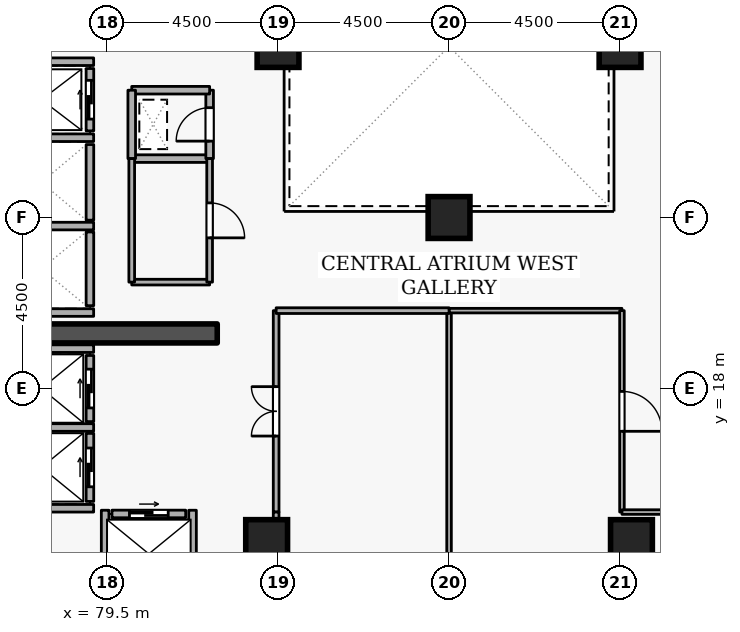
"""IFC4 building model, lengths in metres.
Left out: names, types, materials, properties, quantities, classifications, styles, units other than length and angle.
Written with IfcOpenShell. Run it as: python <this file> out.ifc"""

import sys

from ifc_helpers import new_model, si_unit, direction, frame, frame_2d, origin, origin_2d, place, context, subcontext, project, spatial, rectangle, extrude, element, fill, save


model = new_model("IFC4")
c1 = context("Model", 3, precision=1e-05, world=origin(), true_north=direction((0.0, 1.0)))
c2 = subcontext(c1, "Body", "Model", "MODEL_VIEW")
j1 = project(units=[si_unit("LENGTHUNIT", "METRE"), si_unit("PLANEANGLEUNIT", "RADIAN")], contexts=[c1])
p1 = place(None, origin())
s1 = spatial("IfcSite", under=j1, at=p1, CompositionType="ELEMENT")
p2 = place(p1, origin())
s2 = spatial("IfcBuilding", under=s1, at=p2, CompositionType="ELEMENT")
p3 = place(p2, frame((0.0, 0.0, 152.7)))
s3 = spatial("IfcBuildingStorey", under=s2, at=p3, CompositionType="ELEMENT", Elevation=152.7)
p4 = place(p3, frame((76.6, 19.45, 0.0), z_axis=(0.0, 0.0, 1.0), x_axis=(1.0, 0.0, 0.0)))
e1 = element("IfcWall", 1, at=p4, inside=s3, PredefinedType="SHEAR", context=c2, shape_type="SweptSolid", body=[
    extrude(rectangle(XDim=5.8, YDim=0.5, at=frame_2d((2.9, 0.0))), origin(), (0.0, 0.0, 1.0), 3.6),
])
for number, where, z_axis, x_axis in (
    (2, (93.3, 14.0, 0.0), (0.0, 0.0, 1.0), (1.0, 0.0, 0.0)),
    (3, (83.7, 14.0, 0.0), (0.0, 0.0, 1.0), (1.0, 0.0, 0.0)),
    (4, (93.0, 27.0, 0.0), (0.0, 0.0, 1.0), (1.0, 0.0, 0.0)),
    (5, (84.0, 27.0, 0.0), (0.0, 0.0, 1.0), (1.0, 0.0, 0.0)),
    (6, (88.5, 22.5, 0.0), (0.0, 0.0, 1.0), (1.0, 0.0, 0.0)),
):
    element("IfcColumn", number, at=place(p3, frame(where, z_axis=z_axis, x_axis=x_axis)), inside=s3, PredefinedType="COLUMN", context=c2, shape_type="SweptSolid", body=[
        extrude(rectangle(XDim=1.1, YDim=1.1, at=origin_2d()), origin(), (0.0, 0.0, 1.0), 3.6),
    ])
p5 = place(p3, frame((79.05, 24.78, 0.0), z_axis=(0.0, 0.0, 1.0), x_axis=(0.0, 1.0, 0.0)))
e7 = element("IfcWall", 7, at=p5, inside=s3, PredefinedType="STANDARD", context=c2, shape_type="SweptSolid", body=[
    extrude(rectangle(XDim=1.64, YDim=0.2, at=frame_2d((0.82, 0.0))), origin(), (0.0, 0.0, 1.0), 3.34),
])
p6 = place(p5, frame((0.31, 0.0, 0.0)))
e8 = element("IfcOpeningElement", 8, at=p6, cuts=e7, PredefinedType="OPENING", context=c2, shape_type="SweptSolid", body=[
    extrude(rectangle(XDim=1.02, YDim=2.06, at=frame_2d((0.51, 1.03))), frame((0.0, 0.11, 0.0), z_axis=(0.0, -1.0, 0.0), x_axis=(1.0, 0.0, 0.0)), (0.0, 0.0, 1.0), 0.22),
])
p7 = place(p3, frame((79.05, 22.43, 0.0), z_axis=(0.0, 0.0, 1.0), x_axis=(0.0, 1.0, 0.0)))
e9 = element("IfcWall", 9, at=p7, inside=s3, PredefinedType="STANDARD", context=c2, shape_type="SweptSolid", body=[
    extrude(rectangle(XDim=1.99, YDim=0.2, at=frame_2d((0.995, 0.0))), origin(), (0.0, 0.0, 1.0), 3.34),
])
p8 = place(p3, frame((79.05, 20.18, 0.0), z_axis=(0.0, 0.0, 1.0), x_axis=(0.0, 1.0, 0.0)))
e10 = element("IfcWall", 10, at=p8, inside=s3, PredefinedType="STANDARD", context=c2, shape_type="SweptSolid", body=[
    extrude(rectangle(XDim=1.94, YDim=0.2, at=frame_2d((0.97, 0.0))), origin(), (0.0, 0.0, 1.0), 3.34),
])
p9 = place(p3, frame((79.05, 17.13, 0.0), z_axis=(0.0, 0.0, 1.0), x_axis=(0.0, 1.0, 0.0)))
e11 = element("IfcWall", 11, at=p9, inside=s3, PredefinedType="STANDARD", context=c2, shape_type="SweptSolid", body=[
    extrude(rectangle(XDim=1.74, YDim=0.2, at=frame_2d((0.87, 0.0))), origin(), (0.0, 0.0, 1.0), 3.34),
])
p10 = place(p9, frame((0.36, 0.0, 0.0)))
e12 = element("IfcOpeningElement", 12, at=p10, cuts=e11, PredefinedType="OPENING", context=c2, shape_type="SweptSolid", body=[
    extrude(rectangle(XDim=1.02, YDim=2.06, at=frame_2d((0.51, 1.03))), frame((0.0, 0.11, 0.0), z_axis=(0.0, -1.0, 0.0), x_axis=(1.0, 0.0, 0.0)), (0.0, 0.0, 1.0), 0.22),
])
p11 = place(p3, frame((79.05, 15.03, 0.0), z_axis=(0.0, 0.0, 1.0), x_axis=(0.0, 1.0, 0.0)))
e13 = element("IfcWall", 13, at=p11, inside=s3, PredefinedType="STANDARD", context=c2, shape_type="SweptSolid", body=[
    extrude(rectangle(XDim=1.79, YDim=0.2, at=frame_2d((0.895, 0.0))), origin(), (0.0, 0.0, 1.0), 3.34),
])
p12 = place(p11, frame((0.385, 0.0, 0.0)))
e14 = element("IfcOpeningElement", 14, at=p12, cuts=e13, PredefinedType="OPENING", context=c2, shape_type="SweptSolid", body=[
    extrude(rectangle(XDim=1.02, YDim=2.06, at=frame_2d((0.51, 1.03))), frame((0.0, 0.11, 0.0), z_axis=(0.0, -1.0, 0.0), x_axis=(1.0, 0.0, 0.0)), (0.0, 0.0, 1.0), 0.22),
])
p13 = place(p3, frame((79.63, 14.7, 0.0), z_axis=(0.0, 0.0, 1.0), x_axis=(1.0, 0.0, 0.0)))
e15 = element("IfcWall", 15, at=p13, inside=s3, PredefinedType="STANDARD", context=c2, shape_type="SweptSolid", body=[
    extrude(rectangle(XDim=1.94, YDim=0.2, at=frame_2d((0.97, 0.0))), origin(), (0.0, 0.0, 1.0), 3.34),
])
p14 = place(p13, frame((0.46, 0.0, 0.0)))
e16 = element("IfcOpeningElement", 16, at=p14, cuts=e15, PredefinedType="OPENING", context=c2, shape_type="SweptSolid", body=[
    extrude(rectangle(XDim=1.02, YDim=2.06, at=frame_2d((0.51, 1.03))), frame((0.0, 0.11, 0.0), z_axis=(0.0, -1.0, 0.0), x_axis=(1.0, 0.0, 0.0)), (0.0, 0.0, 1.0), 0.22),
])
for number, where, z_axis, x_axis in (
    (17, (76.612, 26.6, 0.0), (0.0, 0.0, 1.0), (1.0, 0.0, 0.0)),
    (18, (76.612, 24.6, 0.0), (0.0, 0.0, 1.0), (1.0, 0.0, 0.0)),
    (19, (76.612, 22.275, 0.0), (0.0, 0.0, 1.0), (1.0, 0.0, 0.0)),
    (20, (76.612, 20.0, 0.0), (0.0, 0.0, 1.0), (1.0, 0.0, 0.0)),
):
    element("IfcWall", number, at=place(p3, frame(where, z_axis=z_axis, x_axis=x_axis)), inside=s3, PredefinedType="STANDARD", context=c2, shape_type="SweptSolid", body=[
        extrude(rectangle(XDim=2.536, YDim=0.2, at=frame_2d((1.268, 0.0))), origin(), (0.0, 0.0, 1.0), 3.34),
    ])
p15 = place(p3, frame((76.402, 19.05, 0.0), z_axis=(0.0, 0.0, 1.0), x_axis=(1.0, 0.0, 0.0)))
e21 = element("IfcWall", 21, at=p15, inside=s3, PredefinedType="STANDARD", context=c2, shape_type="SweptSolid", body=[
    extrude(rectangle(XDim=2.746, YDim=0.2, at=frame_2d((1.373, 0.0))), origin(), (0.0, 0.0, 1.0), 2.545),
])
p16 = place(p3, frame((76.402, 16.975, 0.0), z_axis=(0.0, 0.0, 1.0), x_axis=(1.0, 0.0, 0.0)))
e22 = element("IfcWall", 22, at=p16, inside=s3, PredefinedType="STANDARD", context=c2, shape_type="SweptSolid", body=[
    extrude(rectangle(XDim=2.746, YDim=0.2, at=frame_2d((1.373, 0.0))), origin(), (0.0, 0.0, 1.0), 3.34),
])
p17 = place(p3, frame((76.512, 14.85, 0.0), z_axis=(0.0, 0.0, 1.0), x_axis=(1.0, 0.0, 0.0)))
e23 = element("IfcWall", 23, at=p17, inside=s3, PredefinedType="STANDARD", context=c2, shape_type="SweptSolid", body=[
    extrude(rectangle(XDim=2.636, YDim=0.2, at=frame_2d((1.318, 0.0))), origin(), (0.0, 0.0, 1.0), 3.34),
])
for number, where, z_axis, x_axis in (
    (24, (81.75, 12.612, 0.0), (0.0, 0.0, 1.0), (0.0, 1.0, 0.0)),
    (25, (79.45, 12.612, 0.0), (0.0, 0.0, 1.0), (0.0, 1.0, 0.0)),
):
    element("IfcWall", number, at=place(p3, frame(where, z_axis=z_axis, x_axis=x_axis)), inside=s3, PredefinedType="STANDARD", context=c2, shape_type="SweptSolid", body=[
        extrude(rectangle(XDim=2.186, YDim=0.2, at=frame_2d((1.093, 0.0))), origin(), (0.0, 0.0, 1.0), 3.34),
    ])
p18 = place(p3, frame((80.15, 24.05, 0.0), z_axis=(0.0, 0.0, 1.0), x_axis=(1.0, 0.0, 0.0)))
e26 = element("IfcWall", 26, at=p18, inside=s3, PredefinedType="STANDARD", context=c2, shape_type="SweptSolid", body=[
    extrude(rectangle(XDim=2.05, YDim=0.2, at=frame_2d((1.025, 0.0))), origin(), (0.0, 0.0, 1.0), 3.34),
])
p19 = place(p3, frame((82.2, 24.05, 0.0), z_axis=(0.0, 0.0, 1.0), x_axis=(0.0, 1.0, 0.0)))
e27 = element("IfcWall", 27, at=p19, inside=s3, PredefinedType="STANDARD", context=c2, shape_type="SweptSolid", body=[
    extrude(rectangle(XDim=1.8, YDim=0.2, at=frame_2d((0.9, 0.0))), origin(), (0.0, 0.0, 1.0), 3.34),
])
p20 = place(p19, frame((0.46, 0.0, 0.0)))
e28 = element("IfcOpeningElement", 28, at=p20, cuts=e27, PredefinedType="OPENING", context=c2, shape_type="SweptSolid", body=[
    extrude(rectangle(XDim=0.88, YDim=2.04, at=frame_2d((0.44, 1.02))), frame((0.0, 0.11, 0.0), z_axis=(0.0, -1.0, 0.0), x_axis=(1.0, 0.0, 0.0)), (0.0, 0.0, 1.0), 0.22),
])
p21 = place(p3, frame((82.2, 25.85, 0.0), z_axis=(0.0, 0.0, 1.0), x_axis=(-1.0, 0.0, 0.0)))
e29 = element("IfcWall", 29, at=p21, inside=s3, PredefinedType="STANDARD", context=c2, shape_type="SweptSolid", body=[
    extrude(rectangle(XDim=2.05, YDim=0.2, at=frame_2d((1.025, 0.0))), origin(), (0.0, 0.0, 1.0), 3.34),
])
p22 = place(p3, frame((80.15, 25.85, 0.0), z_axis=(0.0, 0.0, 1.0), x_axis=(0.0, -1.0, 0.0)))
e30 = element("IfcWall", 30, at=p22, inside=s3, PredefinedType="STANDARD", context=c2, shape_type="SweptSolid", body=[
    extrude(rectangle(XDim=1.8, YDim=0.2, at=frame_2d((0.9, 0.0))), origin(), (0.0, 0.0, 1.0), 3.34),
])
p23 = place(p3, frame((82.2, 20.8, 0.0), z_axis=(0.0, 0.0, 1.0), x_axis=(-1.0, 0.0, 0.0)))
e31 = element("IfcWall", 31, at=p23, inside=s3, PredefinedType="PARTITIONING", context=c2, shape_type="SweptSolid", body=[
    extrude(rectangle(XDim=2.05, YDim=0.15, at=frame_2d((1.025, 0.0))), origin(), (0.0, 0.0, 1.0), 3.34),
])
p24 = place(p3, frame((80.15, 20.8, 0.0), z_axis=(0.0, 0.0, 1.0), x_axis=(0.0, 1.0, 0.0)))
e32 = element("IfcWall", 32, at=p24, inside=s3, PredefinedType="PARTITIONING", context=c2, shape_type="SweptSolid", body=[
    extrude(rectangle(XDim=3.25, YDim=0.15, at=frame_2d((1.625, 0.0))), origin(), (0.0, 0.0, 1.0), 3.34),
])
p25 = place(p3, frame((82.2, 24.05, 0.0), z_axis=(0.0, 0.0, 1.0), x_axis=(0.0, -1.0, 0.0)))
e33 = element("IfcWall", 33, at=p25, inside=s3, PredefinedType="PARTITIONING", context=c2, shape_type="SweptSolid", body=[
    extrude(rectangle(XDim=3.25, YDim=0.15, at=frame_2d((1.625, 0.0))), origin(), (0.0, 0.0, 1.0), 3.34),
])
p26 = place(p25, frame((1.165, 0.0, 0.0)))
e34 = element("IfcOpeningElement", 34, at=p26, cuts=e33, PredefinedType="OPENING", context=c2, shape_type="SweptSolid", body=[
    extrude(rectangle(XDim=0.92, YDim=2.08, at=frame_2d((0.46, 1.04))), frame((0.0, 0.085, 0.0), z_axis=(0.0, -1.0, 0.0), x_axis=(1.0, 0.0, 0.0)), (0.0, 0.0, 1.0), 0.17),
])
p27 = place(p3, frame((88.5, 9.28, 0.0), z_axis=(0.0, 0.0, 1.0), x_axis=(0.0, 1.0, 0.0)))
e35 = element("IfcWall", 35, at=p27, inside=s3, PredefinedType="PARTITIONING", context=c2, shape_type="SweptSolid", body=[
    extrude(rectangle(XDim=10.77, YDim=0.12, at=frame_2d((5.385, 0.0))), origin(), (0.0, 0.0, 1.0), 2.932),
])
p28 = place(p3, frame((88.5, 20.05, 0.0), z_axis=(0.0, 0.0, 1.0), x_axis=(1.0, 0.0, 0.0)))
e36 = element("IfcWall", 36, at=p28, inside=s3, PredefinedType="PARTITIONING", context=c2, shape_type="SweptSolid", body=[
    extrude(rectangle(XDim=4.55, YDim=0.12, at=frame_2d((2.275, 0.0))), origin(), (0.0, 0.0, 1.0), 3.34),
])
p29 = place(p3, frame((93.05, 20.05, 0.0), z_axis=(0.0, 0.0, 1.0), x_axis=(0.0, -1.0, 0.0)))
e37 = element("IfcWall", 37, at=p29, inside=s3, PredefinedType="PARTITIONING", context=c2, shape_type="SweptSolid", body=[
    extrude(rectangle(XDim=5.3, YDim=0.12, at=frame_2d((2.65, 0.0))), origin(), (0.0, 0.0, 1.0), 3.34),
])
p30 = place(p29, frame((2.125, 0.0, 0.0)))
e38 = element("IfcOpeningElement", 38, at=p30, cuts=e37, PredefinedType="OPENING", context=c2, shape_type="SweptSolid", body=[
    extrude(rectangle(XDim=1.05, YDim=2.1, at=frame_2d((0.525, 1.05))), frame((0.0, 0.07, 0.0), z_axis=(0.0, -1.0, 0.0), x_axis=(1.0, 0.0, 0.0)), (0.0, 0.0, 1.0), 0.14),
])
p31 = place(p3, frame((93.05, 14.75, 0.0), z_axis=(0.0, 0.0, 1.0), x_axis=(1.0, 0.0, 0.0)))
e39 = element("IfcWall", 39, at=p31, inside=s3, PredefinedType="PARTITIONING", context=c2, shape_type="SweptSolid", body=[
    extrude(rectangle(XDim=1.75, YDim=0.12, at=frame_2d((0.875, 0.0))), origin(), (0.0, 0.0, 1.0), 3.34),
])
p32 = place(p3, frame((83.95, 14.75, 0.0), z_axis=(0.0, 0.0, 1.0), x_axis=(0.0, 1.0, 0.0)))
e40 = element("IfcWall", 40, at=p32, inside=s3, PredefinedType="PARTITIONING", context=c2, shape_type="SweptSolid", body=[
    extrude(rectangle(XDim=5.3, YDim=0.15, at=frame_2d((2.65, 0.0))), origin(), (0.0, 0.0, 1.0), 3.34),
])
p33 = place(p32, frame((2.0, 0.0, 0.0)))
e41 = element("IfcOpeningElement", 41, at=p33, cuts=e40, PredefinedType="OPENING", context=c2, shape_type="SweptSolid", body=[
    extrude(rectangle(XDim=1.3, YDim=2.12, at=frame_2d((0.65, 1.06))), frame((0.0, 0.085, 0.0), z_axis=(0.0, -1.0, 0.0), x_axis=(1.0, 0.0, 0.0)), (0.0, 0.0, 1.0), 0.17),
])
p34 = place(p3, frame((83.95, 20.05, 0.0), z_axis=(0.0, 0.0, 1.0), x_axis=(1.0, 0.0, 0.0)))
e42 = element("IfcWall", 42, at=p34, inside=s3, PredefinedType="PARTITIONING", context=c2, shape_type="SweptSolid", body=[
    extrude(rectangle(XDim=4.55, YDim=0.15, at=frame_2d((2.275, 0.0))), origin(), (0.0, 0.0, 1.0), 3.34),
])
p35 = place(p3, frame((83.95, 12.4, 0.0), z_axis=(0.0, 0.0, 1.0), x_axis=(0.0, 1.0, 0.0)))
e43 = element("IfcWall", 43, at=p35, inside=s3, PredefinedType="PARTITIONING", context=c2, shape_type="SweptSolid", body=[
    extrude(rectangle(XDim=2.35, YDim=0.15, at=frame_2d((1.175, 0.0))), origin(), (0.0, 0.0, 1.0), 3.34),
])
p36 = place(p6, origin())
e44 = element("IfcDoor", 44, at=p36, inside=s3, OperationType="SLIDING_TO_LEFT", PredefinedType="DOOR", context=c2, shape_type="SweptSolid", body=[
    extrude(rectangle(XDim=1.02, YDim=2.06, at=frame_2d((0.51, 1.03))), frame((0.0, 0.025, 0.0), z_axis=(0.0, -1.0, 0.0), x_axis=(1.0, 0.0, 0.0)), (0.0, 0.0, 1.0), 0.05),
])
fill(e8, e44)
p37 = place(p10, origin())
e45 = element("IfcDoor", 45, at=p37, inside=s3, OperationType="SLIDING_TO_LEFT", PredefinedType="DOOR", context=c2, shape_type="SweptSolid", body=[
    extrude(rectangle(XDim=1.02, YDim=2.06, at=frame_2d((0.51, 1.03))), frame((0.0, 0.025, 0.0), z_axis=(0.0, -1.0, 0.0), x_axis=(1.0, 0.0, 0.0)), (0.0, 0.0, 1.0), 0.05),
])
fill(e12, e45)
p38 = place(p12, origin())
e46 = element("IfcDoor", 46, at=p38, inside=s3, OperationType="SLIDING_TO_LEFT", PredefinedType="DOOR", context=c2, shape_type="SweptSolid", body=[
    extrude(rectangle(XDim=1.02, YDim=2.06, at=frame_2d((0.51, 1.03))), frame((0.0, 0.025, 0.0), z_axis=(0.0, -1.0, 0.0), x_axis=(1.0, 0.0, 0.0)), (0.0, 0.0, 1.0), 0.05),
])
fill(e14, e46)
p39 = place(p14, origin())
e47 = element("IfcDoor", 47, at=p39, inside=s3, OperationType="SLIDING_TO_LEFT", PredefinedType="DOOR", context=c2, shape_type="SweptSolid", body=[
    extrude(rectangle(XDim=1.02, YDim=2.06, at=frame_2d((0.51, 1.03))), frame((0.0, 0.025, 0.0), z_axis=(0.0, -1.0, 0.0), x_axis=(1.0, 0.0, 0.0)), (0.0, 0.0, 1.0), 0.05),
])
fill(e16, e47)
p40 = place(p20, origin())
e48 = element("IfcDoor", 48, at=p40, inside=s3, OperationType="SINGLE_SWING_LEFT", PredefinedType="DOOR", context=c2, shape_type="SweptSolid", body=[
    extrude(rectangle(XDim=0.88, YDim=2.04, at=frame_2d((0.44, 1.02))), frame((0.0, 0.025, 0.0), z_axis=(0.0, -1.0, 0.0), x_axis=(1.0, 0.0, 0.0)), (0.0, 0.0, 1.0), 0.05),
])
fill(e28, e48)
p41 = place(p26, origin())
e49 = element("IfcDoor", 49, at=p41, inside=s3, OperationType="SINGLE_SWING_RIGHT", PredefinedType="DOOR", context=c2, shape_type="SweptSolid", body=[
    extrude(rectangle(XDim=0.92, YDim=2.08, at=frame_2d((0.46, 1.04))), frame((0.0, 0.025, 0.0), z_axis=(0.0, -1.0, 0.0), x_axis=(1.0, 0.0, 0.0)), (0.0, 0.0, 1.0), 0.05),
])
fill(e34, e49)
p42 = place(p30, origin())
e50 = element("IfcDoor", 50, at=p42, inside=s3, OperationType="SINGLE_SWING_RIGHT", PredefinedType="DOOR", context=c2, shape_type="SweptSolid", body=[
    extrude(rectangle(XDim=1.05, YDim=2.1, at=frame_2d((0.525, 1.05))), frame((0.0, 0.025, 0.0), z_axis=(0.0, -1.0, 0.0), x_axis=(1.0, 0.0, 0.0)), (0.0, 0.0, 1.0), 0.05),
])
fill(e38, e50)
p43 = place(p33, origin())
e51 = element("IfcDoor", 51, at=p43, inside=s3, OperationType="DOUBLE_DOOR_SINGLE_SWING", PredefinedType="DOOR", context=c2, shape_type="SweptSolid", body=[
    extrude(rectangle(XDim=1.3, YDim=2.12, at=frame_2d((0.65, 1.06))), frame((0.0, 0.025, 0.0), z_axis=(0.0, -1.0, 0.0), x_axis=(1.0, 0.0, 0.0)), (0.0, 0.0, 1.0), 0.05),
])
fill(e41, e51)
save(model, sys.argv[1])
